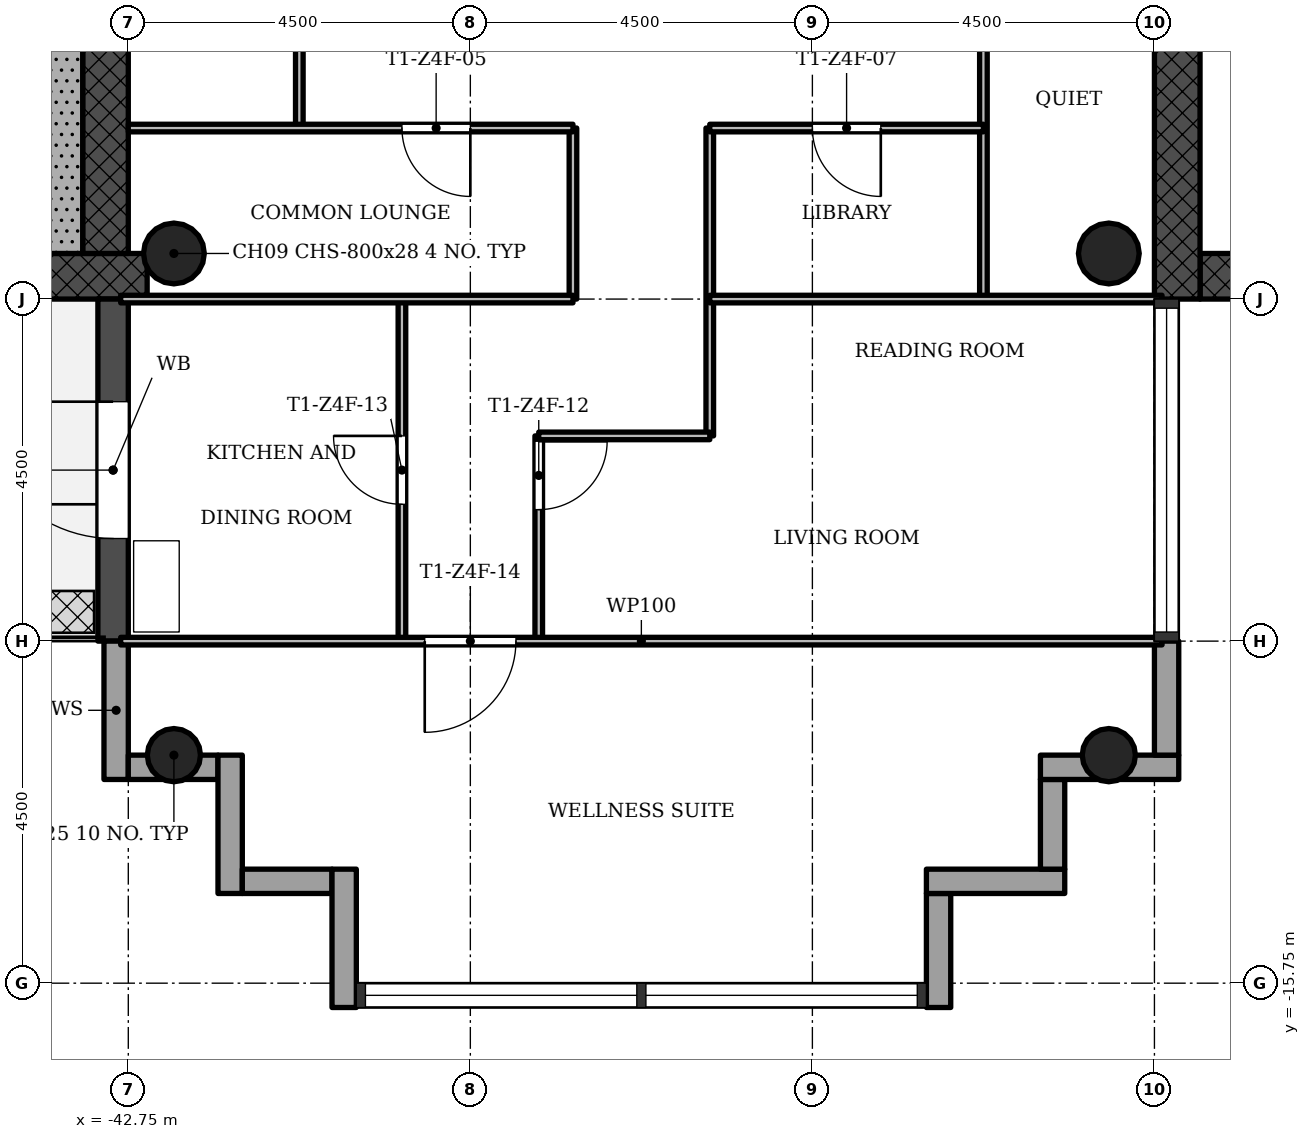
"""IFC4 building model, lengths in metres.
Left out: names, types, materials, properties, quantities, classifications, styles, units other than length and angle.
Written with IfcOpenShell. Run it as: python <this file> out.ifc"""

import sys

from ifc_helpers import new_model, si_unit, direction, frame, frame_2d, origin, origin_2d, place, context, subcontext, project, spatial, rectangle, hollow_circle, extrude, element, fill, save


model = new_model("IFC4")
c1 = context("Model", 3, precision=1e-05, world=origin(), true_north=direction((0.0, 1.0)))
c2 = subcontext(c1, "Body", "Model", "MODEL_VIEW")
j1 = project(units=[si_unit("LENGTHUNIT", "METRE"), si_unit("PLANEANGLEUNIT", "RADIAN")], contexts=[c1])
p1 = place(None, origin())
s1 = spatial("IfcSite", under=j1, at=p1, CompositionType="ELEMENT")
p2 = place(p1, origin())
s2 = spatial("IfcBuilding", under=s1, at=p2, CompositionType="ELEMENT")
p3 = place(p2, frame((0.0, 0.0, 219.8)))
s3 = spatial("IfcBuildingStorey", under=s2, at=p3, CompositionType="ELEMENT", Elevation=219.8)
p4 = place(p3, frame((-28.65, -6.45, 0.0), z_axis=(0.0, 0.0, 1.0), x_axis=(1.0, 0.0, 0.0)))
e1 = element("IfcWall", 1, at=p4, inside=s3, PredefinedType="SHEAR", context=c2, shape_type="SweptSolid", body=[
    extrude(rectangle(XDim=8.4, YDim=0.6, at=frame_2d((4.2, 0.0))), origin(), (0.0, 0.0, 1.0), 3.4),
])
p5 = place(p3, frame((-28.95, 6.15, 0.0), z_axis=(0.0, 0.0, 1.0), x_axis=(0.0, -1.0, 0.0)))
e2 = element("IfcWall", 2, at=p5, inside=s3, PredefinedType="SHEAR", context=c2, shape_type="SweptSolid", body=[
    extrude(rectangle(XDim=12.9, YDim=0.6, at=frame_2d((6.45, 0.0))), origin(), (0.0, 0.0, 1.0), 3.4),
])
p6 = place(p5, frame((5.25, 0.0, 0.0)))
e3 = element("IfcOpeningElement", 3, at=p6, cuts=e2, PredefinedType="OPENING", context=c2, shape_type="SweptSolid", body=[
    extrude(rectangle(XDim=1.8, YDim=2.1, at=frame_2d((0.9, 1.05))), frame((0.0, 0.31, 0.0), z_axis=(0.0, -1.0, 0.0), x_axis=(1.0, 0.0, 0.0)), (0.0, 0.0, 1.0), 0.62),
])
p7 = place(p3, frame((-51.15, -6.45, 0.0), z_axis=(0.0, 0.0, 1.0), x_axis=(1.0, 0.0, 0.0)))
e4 = element("IfcWall", 4, at=p7, inside=s3, PredefinedType="SHEAR", context=c2, shape_type="SweptSolid", body=[
    extrude(rectangle(XDim=8.648, YDim=0.6, at=frame_2d((4.324, 0.0))), origin(), (0.0, 0.0, 1.0), 3.4),
])
p8 = place(p3, frame((-43.05, -6.15, 0.0), z_axis=(0.0, 0.0, 1.0), x_axis=(0.0, 1.0, 0.0)))
e5 = element("IfcWall", 5, at=p8, inside=s3, PredefinedType="SHEAR", context=c2, shape_type="SweptSolid", body=[
    extrude(rectangle(XDim=12.9, YDim=0.6, at=frame_2d((6.45, 0.0))), origin(), (0.0, 0.0, 1.0), 3.4),
])
p9 = place(p8, frame((5.25, 0.0, 0.0)))
e6 = element("IfcOpeningElement", 6, at=p9, cuts=e5, PredefinedType="OPENING", context=c2, shape_type="SweptSolid", body=[
    extrude(rectangle(XDim=1.8, YDim=2.1, at=frame_2d((0.9, 1.05))), frame((0.0, 0.31, 0.0), z_axis=(0.0, -1.0, 0.0), x_axis=(1.0, 0.0, 0.0)), (0.0, 0.0, 1.0), 0.62),
])
for number, where, z_axis, x_axis in (
    (7, (-42.15, -12.75, 0.0), (0.0, 0.0, 1.0), (1.0, 0.0, 0.0)),
    (8, (-29.85, -12.75, 0.0), (0.0, 0.0, 1.0), (1.0, 0.0, 0.0)),
):
    element("IfcColumn", number, at=place(p3, frame(where, z_axis=z_axis, x_axis=x_axis)), inside=s3, PredefinedType="COLUMN", context=c2, shape_type="SweptSolid", body=[
        extrude(hollow_circle(Radius=0.35, WallThickness=0.025, at=origin_2d()), origin(), (0.0, 0.0, 1.0), 3.4),
    ])
for number, where, z_axis, x_axis in (
    (9, (-42.15, -6.15, 0.0), (0.0, 0.0, 1.0), (1.0, 0.0, 0.0)),
    (10, (-29.85, -6.15, 0.0), (0.0, 0.0, 1.0), (1.0, 0.0, 0.0)),
):
    element("IfcColumn", number, at=place(p3, frame(where, z_axis=z_axis, x_axis=x_axis)), inside=s3, PredefinedType="COLUMN", context=c2, shape_type="SweptSolid", body=[
        extrude(hollow_circle(Radius=0.4, WallThickness=0.028, at=origin_2d()), origin(), (0.0, 0.0, 1.0), 3.4),
    ])
p10 = place(p3, frame((-42.95, -6.75, -0.02), z_axis=(0.0, 0.0, 1.0), x_axis=(0.0, -1.0, 0.0)))
e11 = element("IfcWall", 11, at=p10, inside=s3, PredefinedType="STANDARD", context=c2, shape_type="SweptSolid", body=[
    extrude(rectangle(XDim=4.5, YDim=0.4, at=frame_2d((2.25, 0.0))), origin(), (0.0, 0.0, 1.0), 3.12),
])
p11 = place(p10, frame((1.35, 0.0, 0.02)))
e12 = element("IfcOpeningElement", 12, at=p11, cuts=e11, PredefinedType="OPENING", context=c2, shape_type="SweptSolid", body=[
    extrude(rectangle(XDim=1.8, YDim=2.1, at=frame_2d((0.9, 1.05))), frame((0.0, 0.21, 0.0), z_axis=(0.0, -1.0, 0.0), x_axis=(1.0, 0.0, 0.0)), (0.0, 0.0, 1.0), 0.42),
])
p12 = place(p3, frame((-42.91, -11.25, -0.3), z_axis=(0.0, 0.0, 1.0), x_axis=(0.0, -1.0, 0.0)))
e13 = element("IfcWall", 13, at=p12, inside=s3, PredefinedType="STANDARD", context=c2, shape_type="SweptSolid", body=[
    extrude(rectangle(XDim=1.82, YDim=0.32, at=frame_2d((0.91, 0.0))), origin(), (0.0, 0.0, 1.0), 3.4),
])
p13 = place(p3, frame((-42.75, -12.91, -0.3), z_axis=(0.0, 0.0, 1.0), x_axis=(1.0, 0.0, 0.0)))
e14 = element("IfcWall", 14, at=p13, inside=s3, PredefinedType="STANDARD", context=c2, shape_type="SweptSolid", body=[
    extrude(rectangle(XDim=1.18, YDim=0.32, at=frame_2d((0.59, 0.0))), origin(), (0.0, 0.0, 1.0), 3.4),
])
p14 = place(p3, frame((-41.41, -12.75, -0.3), z_axis=(0.0, 0.0, 1.0), x_axis=(0.0, -1.0, 0.0)))
e15 = element("IfcWall", 15, at=p14, inside=s3, PredefinedType="STANDARD", context=c2, shape_type="SweptSolid", body=[
    extrude(rectangle(XDim=1.82, YDim=0.32, at=frame_2d((0.91, 0.0))), origin(), (0.0, 0.0, 1.0), 3.4),
])
p15 = place(p3, frame((-41.25, -14.41, -0.3), z_axis=(0.0, 0.0, 1.0), x_axis=(1.0, 0.0, 0.0)))
e16 = element("IfcWall", 16, at=p15, inside=s3, PredefinedType="STANDARD", context=c2, shape_type="SweptSolid", body=[
    extrude(rectangle(XDim=1.18, YDim=0.32, at=frame_2d((0.59, 0.0))), origin(), (0.0, 0.0, 1.0), 3.4),
])
p16 = place(p3, frame((-39.91, -14.25, -0.3), z_axis=(0.0, 0.0, 1.0), x_axis=(0.0, -1.0, 0.0)))
e17 = element("IfcWall", 17, at=p16, inside=s3, PredefinedType="STANDARD", context=c2, shape_type="SweptSolid", body=[
    extrude(rectangle(XDim=1.82, YDim=0.32, at=frame_2d((0.91, 0.0))), origin(), (0.0, 0.0, 1.0), 3.4),
])
p17 = place(p3, frame((-32.09, -16.07, -0.3), z_axis=(0.0, 0.0, 1.0), x_axis=(0.0, 1.0, 0.0)))
e18 = element("IfcWall", 18, at=p17, inside=s3, PredefinedType="STANDARD", context=c2, shape_type="SweptSolid", body=[
    extrude(rectangle(XDim=1.5, YDim=0.32, at=frame_2d((0.75, 0.0))), origin(), (0.0, 0.0, 1.0), 3.4),
])
p18 = place(p3, frame((-32.25, -14.41, -0.3), z_axis=(0.0, 0.0, 1.0), x_axis=(1.0, 0.0, 0.0)))
e19 = element("IfcWall", 19, at=p18, inside=s3, PredefinedType="STANDARD", context=c2, shape_type="SweptSolid", body=[
    extrude(rectangle(XDim=1.82, YDim=0.32, at=frame_2d((0.91, 0.0))), origin(), (0.0, 0.0, 1.0), 3.4),
])
p19 = place(p3, frame((-30.59, -14.25, -0.3), z_axis=(0.0, 0.0, 1.0), x_axis=(0.0, 1.0, 0.0)))
e20 = element("IfcWall", 20, at=p19, inside=s3, PredefinedType="STANDARD", context=c2, shape_type="SweptSolid", body=[
    extrude(rectangle(XDim=1.18, YDim=0.32, at=frame_2d((0.59, 0.0))), origin(), (0.0, 0.0, 1.0), 3.4),
])
p20 = place(p3, frame((-30.75, -12.91, -0.3), z_axis=(0.0, 0.0, 1.0), x_axis=(1.0, 0.0, 0.0)))
e21 = element("IfcWall", 21, at=p20, inside=s3, PredefinedType="STANDARD", context=c2, shape_type="SweptSolid", body=[
    extrude(rectangle(XDim=1.82, YDim=0.32, at=frame_2d((0.91, 0.0))), origin(), (0.0, 0.0, 1.0), 3.4),
])
p21 = place(p3, frame((-29.09, -12.75, -0.3), z_axis=(0.0, 0.0, 1.0), x_axis=(0.0, 1.0, 0.0)))
e22 = element("IfcWall", 22, at=p21, inside=s3, PredefinedType="STANDARD", context=c2, shape_type="SweptSolid", body=[
    extrude(rectangle(XDim=1.5, YDim=0.32, at=frame_2d((0.75, 0.0))), origin(), (0.0, 0.0, 1.0), 3.4),
])
p22 = place(p3, frame((-40.5, -4.5, 0.0), z_axis=(0.0, 0.0, 1.0), x_axis=(0.0, 1.0, 0.0)))
e23 = element("IfcWall", 23, at=p22, inside=s3, PredefinedType="PARTITIONING", context=c2, shape_type="SweptSolid", body=[
    extrude(rectangle(XDim=3.0, YDim=0.1, at=frame_2d((1.5, 0.0))), origin(), (0.0, 0.0, 1.0), 3.0),
])
p23 = place(p22, frame((1.05, 0.0, 0.0)))
e24 = element("IfcOpeningElement", 24, at=p23, cuts=e23, PredefinedType="OPENING", context=c2, shape_type="SweptSolid", body=[
    extrude(rectangle(XDim=0.9, YDim=2.1, at=frame_2d((0.45, 1.05))), frame((0.0, 0.06, 0.0), z_axis=(0.0, -1.0, 0.0), x_axis=(1.0, 0.0, 0.0)), (0.0, 0.0, 1.0), 0.12),
])
p24 = place(p3, frame((-39.15, -11.25, 0.0), z_axis=(0.0, 0.0, 1.0), x_axis=(0.0, 1.0, 0.0)))
e25 = element("IfcWall", 25, at=p24, inside=s3, PredefinedType="PARTITIONING", context=c2, shape_type="SweptSolid", body=[
    extrude(rectangle(XDim=4.5, YDim=0.1, at=frame_2d((2.25, 0.0))), origin(), (0.0, 0.0, 1.0), 3.0),
])
p25 = place(p24, frame((1.8, 0.0, 0.0)))
e26 = element("IfcOpeningElement", 26, at=p25, cuts=e25, PredefinedType="OPENING", context=c2, shape_type="SweptSolid", body=[
    extrude(rectangle(XDim=0.9, YDim=2.1, at=frame_2d((0.45, 1.05))), frame((0.0, 0.06, 0.0), z_axis=(0.0, -1.0, 0.0), x_axis=(1.0, 0.0, 0.0)), (0.0, 0.0, 1.0), 0.12),
])
p26 = place(p3, frame((-37.35, -11.25, 0.0), z_axis=(0.0, 0.0, 1.0), x_axis=(0.0, 1.0, 0.0)))
e27 = element("IfcWall", 27, at=p26, inside=s3, PredefinedType="PARTITIONING", context=c2, shape_type="SweptSolid", body=[
    extrude(rectangle(XDim=2.7, YDim=0.1, at=frame_2d((1.35, 0.0))), origin(), (0.0, 0.0, 1.0), 3.0),
])
p27 = place(p26, frame((1.73, 0.0, 0.0)))
e28 = element("IfcOpeningElement", 28, at=p27, cuts=e27, PredefinedType="OPENING", context=c2, shape_type="SweptSolid", body=[
    extrude(rectangle(XDim=0.9, YDim=2.1, at=frame_2d((0.45, 1.05))), frame((0.0, 0.06, 0.0), z_axis=(0.0, -1.0, 0.0), x_axis=(1.0, 0.0, 0.0)), (0.0, 0.0, 1.0), 0.12),
])
p28 = place(p3, frame((-36.9, -6.75, 0.0), z_axis=(0.0, 0.0, 1.0), x_axis=(0.0, 1.0, 0.0)))
e29 = element("IfcWall", 29, at=p28, inside=s3, PredefinedType="PARTITIONING", context=c2, shape_type="SweptSolid", body=[
    extrude(rectangle(XDim=2.25, YDim=0.1, at=frame_2d((1.125, 0.0))), origin(), (0.0, 0.0, 1.0), 3.0),
])
p29 = place(p3, frame((-35.1, -8.55, 0.0), z_axis=(0.0, 0.0, 1.0), x_axis=(0.0, 1.0, 0.0)))
e30 = element("IfcWall", 30, at=p29, inside=s3, PredefinedType="PARTITIONING", context=c2, shape_type="SweptSolid", body=[
    extrude(rectangle(XDim=4.05, YDim=0.1, at=frame_2d((2.025, 0.0))), origin(), (0.0, 0.0, 1.0), 3.0),
])
p30 = place(p3, frame((-31.5, -6.75, 0.0), z_axis=(0.0, 0.0, 1.0), x_axis=(0.0, 1.0, 0.0)))
e31 = element("IfcWall", 31, at=p30, inside=s3, PredefinedType="PARTITIONING", context=c2, shape_type="SweptSolid", body=[
    extrude(rectangle(XDim=5.25, YDim=0.1, at=frame_2d((2.625, 0.0))), origin(), (0.0, 0.0, 1.0), 3.0),
])
p31 = place(p30, frame((3.3, 0.0, 0.0)))
e32 = element("IfcOpeningElement", 32, at=p31, cuts=e31, PredefinedType="OPENING", context=c2, shape_type="SweptSolid", body=[
    extrude(rectangle(XDim=0.9, YDim=2.1, at=frame_2d((0.45, 1.05))), frame((0.0, 0.06, 0.0), z_axis=(0.0, -1.0, 0.0), x_axis=(1.0, 0.0, 0.0)), (0.0, 0.0, 1.0), 0.12),
])
p32 = place(p3, frame((-42.85, -11.25, 0.0), z_axis=(0.0, 0.0, 1.0), x_axis=(1.0, 0.0, 0.0)))
e33 = element("IfcWall", 33, at=p32, inside=s3, PredefinedType="PARTITIONING", context=c2, shape_type="SweptSolid", body=[
    extrude(rectangle(XDim=13.7, YDim=0.1, at=frame_2d((6.85, 0.0))), origin(), (0.0, 0.0, 1.0), 3.0),
])
p33 = place(p32, frame((4.0, 0.0, 0.0)))
e34 = element("IfcOpeningElement", 34, at=p33, cuts=e33, PredefinedType="OPENING", context=c2, shape_type="SweptSolid", body=[
    extrude(rectangle(XDim=1.2, YDim=2.1, at=frame_2d((0.6, 1.05))), frame((0.0, 0.06, 0.0), z_axis=(0.0, -1.0, 0.0), x_axis=(1.0, 0.0, 0.0)), (0.0, 0.0, 1.0), 0.12),
])
p34 = place(p3, frame((-37.35, -8.55, 0.0), z_axis=(0.0, 0.0, 1.0), x_axis=(1.0, 0.0, 0.0)))
e35 = element("IfcWall", 35, at=p34, inside=s3, PredefinedType="PARTITIONING", context=c2, shape_type="SweptSolid", body=[
    extrude(rectangle(XDim=2.25, YDim=0.1, at=frame_2d((1.125, 0.0))), origin(), (0.0, 0.0, 1.0), 3.0),
])
for number, where, z_axis, x_axis in (
    (36, (-42.85, -6.75, 0.0), (0.0, 0.0, 1.0), (1.0, 0.0, 0.0)),
    (37, (-35.1, -6.75, 0.0), (0.0, 0.0, 1.0), (1.0, 0.0, 0.0)),
):
    element("IfcWall", number, at=place(p3, frame(where, z_axis=z_axis, x_axis=x_axis)), inside=s3, PredefinedType="PARTITIONING", context=c2, shape_type="SweptSolid", body=[
        extrude(rectangle(XDim=5.95, YDim=0.1, at=frame_2d((2.975, 0.0))), origin(), (0.0, 0.0, 1.0), 3.0),
    ])
p35 = place(p3, frame((-42.75, -4.5, 0.0), z_axis=(0.0, 0.0, 1.0), x_axis=(1.0, 0.0, 0.0)))
e38 = element("IfcWall", 38, at=p35, inside=s3, PredefinedType="PARTITIONING", context=c2, shape_type="SweptSolid", body=[
    extrude(rectangle(XDim=5.85, YDim=0.1, at=frame_2d((2.925, 0.0))), origin(), (0.0, 0.0, 1.0), 3.0),
])
p36 = place(p35, frame((3.6, 0.0, 0.0)))
e39 = element("IfcOpeningElement", 39, at=p36, cuts=e38, PredefinedType="OPENING", context=c2, shape_type="SweptSolid", body=[
    extrude(rectangle(XDim=0.9, YDim=2.1, at=frame_2d((0.45, 1.05))), frame((0.0, 0.06, 0.0), z_axis=(0.0, -1.0, 0.0), x_axis=(1.0, 0.0, 0.0)), (0.0, 0.0, 1.0), 0.12),
])
p37 = place(p3, frame((-35.1, -4.5, 0.0), z_axis=(0.0, 0.0, 1.0), x_axis=(1.0, 0.0, 0.0)))
e40 = element("IfcWall", 40, at=p37, inside=s3, PredefinedType="PARTITIONING", context=c2, shape_type="SweptSolid", body=[
    extrude(rectangle(XDim=3.6, YDim=0.1, at=frame_2d((1.8, 0.0))), origin(), (0.0, 0.0, 1.0), 3.0),
])
p38 = place(p37, frame((1.35, 0.0, 0.0)))
e41 = element("IfcOpeningElement", 41, at=p38, cuts=e40, PredefinedType="OPENING", context=c2, shape_type="SweptSolid", body=[
    extrude(rectangle(XDim=0.9, YDim=2.1, at=frame_2d((0.45, 1.05))), frame((0.0, 0.06, 0.0), z_axis=(0.0, -1.0, 0.0), x_axis=(1.0, 0.0, 0.0)), (0.0, 0.0, 1.0), 0.12),
])
p39 = place(p3, frame((-43.65, -1.85, 0.0), z_axis=(0.0, 0.0, 1.0), x_axis=(0.0, -1.0, 0.0)))
e42 = element("IfcWall", 42, at=p39, inside=s3, PredefinedType="SHEAR", context=c2, shape_type="SweptSolid", body=[
    extrude(rectangle(XDim=4.3, YDim=0.6, at=frame_2d((2.15, 0.0))), origin(), (0.0, 0.0, 1.0), 3.4),
])
p40 = place(p11, origin())
e43 = element("IfcDoor", 43, at=p40, inside=s3, OperationType="SINGLE_SWING_LEFT", PredefinedType="DOOR", context=c2, shape_type="SweptSolid", body=[
    extrude(rectangle(XDim=1.8, YDim=2.1, at=frame_2d((0.9, 1.05))), frame((0.0, 0.025, 0.0), z_axis=(0.0, -1.0, 0.0), x_axis=(1.0, 0.0, 0.0)), (0.0, 0.0, 1.0), 0.05),
])
fill(e12, e43)
p41 = place(p36, origin())
e44 = element("IfcDoor", 44, at=p41, inside=s3, OperationType="SINGLE_SWING_RIGHT", PredefinedType="DOOR", context=c2, shape_type="SweptSolid", body=[
    extrude(rectangle(XDim=0.9, YDim=2.1, at=frame_2d((0.45, 1.05))), frame((0.0, 0.025, 0.0), z_axis=(0.0, -1.0, 0.0), x_axis=(1.0, 0.0, 0.0)), (0.0, 0.0, 1.0), 0.05),
])
fill(e39, e44)
p42 = place(p38, origin())
e45 = element("IfcDoor", 45, at=p42, inside=s3, OperationType="SINGLE_SWING_RIGHT", PredefinedType="DOOR", context=c2, shape_type="SweptSolid", body=[
    extrude(rectangle(XDim=0.9, YDim=2.1, at=frame_2d((0.45, 1.05))), frame((0.0, 0.025, 0.0), z_axis=(0.0, -1.0, 0.0), x_axis=(1.0, 0.0, 0.0)), (0.0, 0.0, 1.0), 0.05),
])
fill(e41, e45)
p43 = place(p27, origin())
e46 = element("IfcDoor", 46, at=p43, inside=s3, OperationType="SINGLE_SWING_RIGHT", PredefinedType="DOOR", context=c2, shape_type="SweptSolid", body=[
    extrude(rectangle(XDim=0.9, YDim=2.1, at=frame_2d((0.45, 1.05))), frame((0.0, 0.025, 0.0), z_axis=(0.0, -1.0, 0.0), x_axis=(1.0, 0.0, 0.0)), (0.0, 0.0, 1.0), 0.05),
])
fill(e28, e46)
p44 = place(p25, origin())
e47 = element("IfcDoor", 47, at=p44, inside=s3, OperationType="SINGLE_SWING_LEFT", PredefinedType="DOOR", context=c2, shape_type="SweptSolid", body=[
    extrude(rectangle(XDim=0.9, YDim=2.1, at=frame_2d((0.45, 1.05))), frame((0.0, 0.025, 0.0), z_axis=(0.0, -1.0, 0.0), x_axis=(1.0, 0.0, 0.0)), (0.0, 0.0, 1.0), 0.05),
])
fill(e26, e47)
p45 = place(p33, origin())
e48 = element("IfcDoor", 48, at=p45, inside=s3, OperationType="SINGLE_SWING_LEFT", PredefinedType="DOOR", context=c2, shape_type="SweptSolid", body=[
    extrude(rectangle(XDim=1.2, YDim=2.1, at=frame_2d((0.6, 1.05))), frame((0.0, 0.025, 0.0), z_axis=(0.0, -1.0, 0.0), x_axis=(1.0, 0.0, 0.0)), (0.0, 0.0, 1.0), 0.05),
])
fill(e34, e48)
save(model, sys.argv[1])
